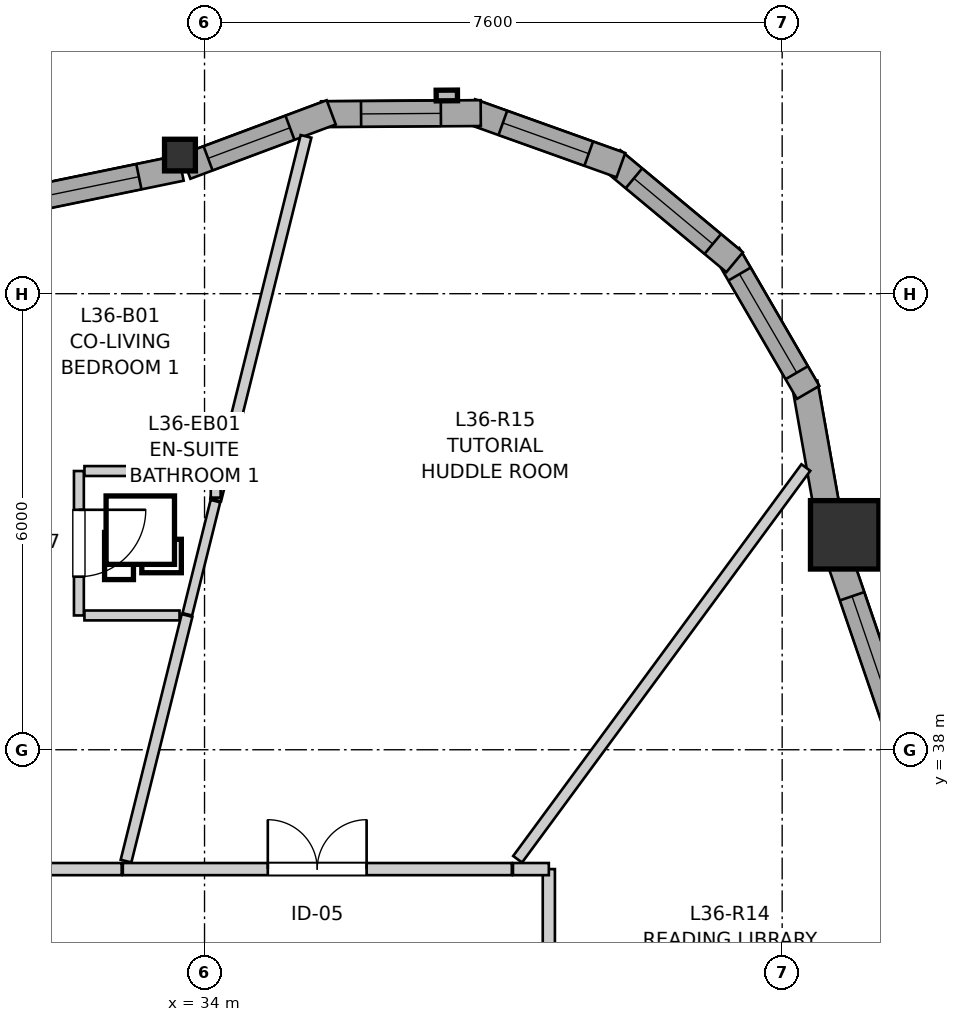
"""IFC4 building model, lengths in metres.
Left out: names, types, materials, properties, quantities, classifications, styles, units other than length and angle.
Written with IfcOpenShell. Run it as: python <this file> out.ifc"""

import sys

from ifc_helpers import new_model, si_unit, direction, frame, frame_2d, origin, origin_2d, place, context, subcontext, project, spatial, rectangle, i_section, extrude, source, transform, mapped, element, fill, save


model = new_model("IFC4")
c1 = context("Model", 3, precision=1e-05, world=origin(), true_north=direction((0.0, 1.0)))
c2 = subcontext(c1, "Body", "Model", "MODEL_VIEW")
j1 = project(units=[si_unit("LENGTHUNIT", "METRE"), si_unit("PLANEANGLEUNIT", "RADIAN")], contexts=[c1])
p1 = place(None, origin())
s1 = spatial("IfcSite", under=j1, at=p1, CompositionType="ELEMENT")
p2 = place(p1, origin())
s2 = spatial("IfcBuilding", under=s1, at=p2, CompositionType="ELEMENT")
p3 = place(p2, frame((0.0, 0.0, 121.6)))
s3 = spatial("IfcBuildingStorey", under=s2, at=p3, CompositionType="ELEMENT", Elevation=121.6)
m1 = source(origin(), c2, "Body", "SweptSolid", [
    extrude(rectangle(XDim=0.9, YDim=0.9, at=origin_2d()), origin(), (0.0, 0.0, 1.0), 2.95),
])
p4 = place(p3, frame((42.423, 40.828, 0.0), z_axis=(0.0, 0.0, 1.0), x_axis=(1.0, 0.0, 0.0)))
e1 = element("IfcColumn", 1, at=p4, inside=s3, PredefinedType="COLUMN", context=c2, shape_type="MappedRepresentation", body=[
    mapped(m1, transform((0.0, 0.0, 0.0), x_axis=(1.0, 0.0, 0.0), y_axis=(0.0, 1.0, 0.0), z_axis=(0.0, 0.0, 1.0), scale=1.0)),
])
m2 = source(origin(), c2, "Body", "SweptSolid", [
    extrude(i_section(OverallWidth=0.406, OverallDepth=0.416, WebThickness=0.027, FlangeThickness=0.044, FilletRadius=0.015, at=origin_2d()), origin(), (0.0, 0.0, 1.0), 2.95),
])
p5 = place(p3, frame((33.677, 45.824, 0.0), z_axis=(0.0, 0.0, 1.0), x_axis=(1.0, 0.0, 0.0)))
e2 = element("IfcColumn", 2, at=p5, inside=s3, PredefinedType="PILASTER", context=c2, shape_type="MappedRepresentation", body=[
    mapped(m2, transform((0.0, 0.0, 0.0), x_axis=(1.0, 0.0, 0.0), y_axis=(0.0, 1.0, 0.0), z_axis=(0.0, 0.0, 1.0), scale=1.0)),
])
p6 = place(p3, frame((43.288, 37.771, 0.0), z_axis=(0.0, 0.0, 1.0), x_axis=(-0.323537149191, 0.94621546864, 0.0)))
e3 = element("IfcWall", 3, at=p6, inside=s3, PredefinedType="SOLIDWALL", context=c2, shape_type="SweptSolid", body=[
    extrude(rectangle(XDim=2.942, YDim=0.34, at=frame_2d((1.471, 0.0))), origin(), (0.0, 0.0, 1.0), 2.48),
])
p7 = place(p6, frame((0.576, 0.0, 0.82)))
e4 = element("IfcOpeningElement", 4, at=p7, cuts=e3, PredefinedType="OPENING", context=c2, shape_type="SweptSolid", body=[
    extrude(rectangle(XDim=1.8, YDim=1.45, at=frame_2d((0.9, 0.725))), frame((0.0, 0.18, 0.0), z_axis=(0.0, -1.0, 0.0), x_axis=(1.0, 0.0, 0.0)), (0.0, 0.0, 1.0), 0.36),
])
p8 = place(p3, frame((42.215, 41.024, 0.0), z_axis=(0.0, 0.0, 1.0), x_axis=(-0.17440141227, 0.984674640375, 0.0)))
e5 = element("IfcWall", 5, at=p8, inside=s3, PredefinedType="SOLIDWALL", context=c2, shape_type="SweptSolid", body=[
    extrude(rectangle(XDim=1.831, YDim=0.34, at=frame_2d((0.916, 0.0))), origin(), (0.0, 0.0, 1.0), 2.48),
])
p9 = place(p3, frame((41.942, 42.701, 0.0), z_axis=(0.0, 0.0, 1.0), x_axis=(-0.501902596059, 0.864924149315, 0.0)))
e6 = element("IfcWall", 6, at=p9, inside=s3, PredefinedType="SOLIDWALL", context=c2, shape_type="SweptSolid", body=[
    extrude(rectangle(XDim=2.099, YDim=0.34, at=frame_2d((1.049, 0.0))), origin(), (0.0, 0.0, 1.0), 2.48),
])
p10 = place(p9, frame((0.3, 0.0, 0.82)))
e7 = element("IfcOpeningElement", 7, at=p10, cuts=e6, PredefinedType="OPENING", context=c2, shape_type="SweptSolid", body=[
    extrude(rectangle(XDim=1.5, YDim=1.45, at=frame_2d((0.75, 0.725))), frame((0.0, 0.18, 0.0), z_axis=(0.0, -1.0, 0.0), x_axis=(1.0, 0.0, 0.0)), (0.0, 0.0, 1.0), 0.36),
])
p11 = place(p3, frame((40.975, 44.414, 0.0), z_axis=(0.0, 0.0, 1.0), x_axis=(-0.768440501876, 0.639921241308, 0.0)))
e8 = element("IfcWall", 8, at=p11, inside=s3, PredefinedType="SOLIDWALL", context=c2, shape_type="SweptSolid", body=[
    extrude(rectangle(XDim=2.099, YDim=0.34, at=frame_2d((1.05, 0.0))), origin(), (0.0, 0.0, 1.0), 2.48),
])
p12 = place(p11, frame((0.375, 0.0, 0.82)))
e9 = element("IfcOpeningElement", 9, at=p12, cuts=e8, PredefinedType="OPENING", context=c2, shape_type="SweptSolid", body=[
    extrude(rectangle(XDim=1.35, YDim=1.45, at=frame_2d((0.675, 0.725))), frame((0.0, 0.18, 0.0), z_axis=(0.0, -1.0, 0.0), x_axis=(1.0, 0.0, 0.0)), (0.0, 0.0, 1.0), 0.36),
])
p13 = place(p3, frame((39.478, 45.691, 0.0), z_axis=(0.0, 0.0, 1.0), x_axis=(-0.941523304278, 0.336947870598, 0.0)))
e10 = element("IfcWall", 10, at=p13, inside=s3, PredefinedType="SOLIDWALL", context=c2, shape_type="SweptSolid", body=[
    extrude(rectangle(XDim=2.099, YDim=0.34, at=frame_2d((1.05, 0.0))), origin(), (0.0, 0.0, 1.0), 2.48),
])
p14 = place(p13, frame((0.449, 0.0, 0.82)))
e11 = element("IfcOpeningElement", 11, at=p14, cuts=e10, PredefinedType="OPENING", context=c2, shape_type="SweptSolid", body=[
    extrude(rectangle(XDim=1.2, YDim=1.45, at=frame_2d((0.6, 0.725))), frame((0.0, 0.18, 0.0), z_axis=(0.0, -1.0, 0.0), x_axis=(1.0, 0.0, 0.0)), (0.0, 0.0, 1.0), 0.36),
])
p15 = place(p3, frame((37.634, 46.376, 0.0), z_axis=(0.0, 0.0, 1.0), x_axis=(-0.999976456891, -0.00686189939, 0.0)))
e12 = element("IfcWall", 12, at=p15, inside=s3, PredefinedType="SOLIDWALL", context=c2, shape_type="SweptSolid", body=[
    extrude(rectangle(XDim=2.099, YDim=0.34, at=frame_2d((1.05, 0.0))), origin(), (0.0, 0.0, 1.0), 2.48),
])
p16 = place(p15, frame((0.524, 0.0, 0.82)))
e13 = element("IfcOpeningElement", 13, at=p16, cuts=e12, PredefinedType="OPENING", context=c2, shape_type="SweptSolid", body=[
    extrude(rectangle(XDim=1.05, YDim=1.45, at=frame_2d((0.525, 0.725))), frame((0.0, 0.18, 0.0), z_axis=(0.0, -1.0, 0.0), x_axis=(1.0, 0.0, 0.0)), (0.0, 0.0, 1.0), 0.36),
])
p17 = place(p3, frame((35.667, 46.386, 0.0), z_axis=(0.0, 0.0, 1.0), x_axis=(-0.936761017964, -0.34996970615, 0.0)))
e14 = element("IfcWall", 14, at=p17, inside=s3, PredefinedType="SOLIDWALL", context=c2, shape_type="SweptSolid", body=[
    extrude(rectangle(XDim=2.041, YDim=0.34, at=frame_2d((1.021, 0.0))), origin(), (0.0, 0.0, 1.0), 2.48),
])
p18 = place(p17, frame((0.579, 0.0, 0.82)))
e15 = element("IfcOpeningElement", 15, at=p18, cuts=e14, PredefinedType="OPENING", context=c2, shape_type="SweptSolid", body=[
    extrude(rectangle(XDim=1.15, YDim=1.2, at=frame_2d((0.575, 0.6))), frame((0.0, 0.18, 0.0), z_axis=(0.0, -1.0, 0.0), x_axis=(1.0, 0.0, 0.0)), (0.0, 0.0, 1.0), 0.36),
])
p19 = place(p3, frame((33.691, 45.653, 0.0), z_axis=(0.0, 0.0, 1.0), x_axis=(-0.979414063846, -0.201861565287, 0.0)))
e16 = element("IfcWall", 16, at=p19, inside=s3, PredefinedType="SOLIDWALL", context=c2, shape_type="SweptSolid", body=[
    extrude(rectangle(XDim=3.104, YDim=0.34, at=frame_2d((1.552, 0.0))), origin(), (0.0, 0.0, 1.0), 2.48),
])
p20 = place(p19, frame((0.567, 0.0, 0.82)))
e17 = element("IfcOpeningElement", 17, at=p20, cuts=e16, PredefinedType="OPENING", context=c2, shape_type="SweptSolid", body=[
    extrude(rectangle(XDim=1.95, YDim=1.4, at=frame_2d((0.975, 0.7))), frame((0.0, 0.18, 0.0), z_axis=(0.0, -1.0, 0.0), x_axis=(1.0, 0.0, 0.0)), (0.0, 0.0, 1.0), 0.36),
])
p21 = place(p3, frame((38.53, 36.43, 0.0), z_axis=(0.0, 0.0, 1.0), x_axis=(0.0, -1.0, 0.0)))
e18 = element("IfcWall", 18, at=p21, inside=s3, PredefinedType="PARTITIONING", context=c2, shape_type="SweptSolid", body=[
    extrude(rectangle(XDim=7.083, YDim=0.16, at=frame_2d((3.542, 0.0))), origin(), (0.0, 0.0, 1.0), 2.588),
])
p22 = place(p21, frame((3.053, 0.0, 0.0)))
e19 = element("IfcOpeningElement", 19, at=p22, cuts=e18, PredefinedType="OPENING", context=c2, shape_type="SweptSolid", body=[
    extrude(rectangle(XDim=0.96, YDim=2.1, at=frame_2d((0.48, 1.05))), frame((0.0, 0.09, 0.0), z_axis=(0.0, -1.0, 0.0), x_axis=(1.0, 0.0, 0.0)), (0.0, 0.0, 1.0), 0.18),
])
p23 = place(p3, frame((32.925, 36.43, 0.0), z_axis=(0.0, 0.0, 1.0), x_axis=(1.0, 0.0, 0.0)))
e20 = element("IfcWall", 20, at=p23, inside=s3, PredefinedType="PARTITIONING", context=c2, shape_type="SweptSolid", body=[
    extrude(rectangle(XDim=5.118, YDim=0.16, at=frame_2d((2.559, 0.0))), origin(), (0.0, 0.0, 1.0), 2.588),
])
p24 = place(p23, frame((1.907, 0.0, 0.0)))
e21 = element("IfcOpeningElement", 21, at=p24, cuts=e20, PredefinedType="OPENING", context=c2, shape_type="SweptSolid", body=[
    extrude(rectangle(XDim=1.3, YDim=2.1, at=frame_2d((0.65, 1.05))), frame((0.0, 0.09, 0.0), z_axis=(0.0, -1.0, 0.0), x_axis=(1.0, 0.0, 0.0)), (0.0, 0.0, 1.0), 0.18),
])
p25 = place(p3, frame((30.063, 36.43, 0.0), z_axis=(0.0, 0.0, 1.0), x_axis=(1.0, 0.0, 0.0)))
e22 = element("IfcWall", 22, at=p25, inside=s3, PredefinedType="PARTITIONING", context=c2, shape_type="SweptSolid", body=[
    extrude(rectangle(XDim=2.847, YDim=0.16, at=frame_2d((1.423, 0.0))), origin(), (0.0, 0.0, 1.0), 2.95),
])
p26 = place(p25, frame((0.964, 0.0, 0.0)))
e23 = element("IfcOpeningElement", 23, at=p26, cuts=e22, PredefinedType="OPENING", context=c2, shape_type="SweptSolid", body=[
    extrude(rectangle(XDim=0.92, YDim=2.1, at=frame_2d((0.46, 1.05))), frame((0.0, 0.09, 0.0), z_axis=(0.0, -1.0, 0.0), x_axis=(1.0, 0.0, 0.0)), (0.0, 0.0, 1.0), 0.18),
])
p27 = place(p3, frame((32.347, 41.667, 0.0), z_axis=(0.0, 0.0, 1.0), x_axis=(0.0, -1.0, 0.0)))
e24 = element("IfcWall", 24, at=p27, inside=s3, PredefinedType="PARTITIONING", context=c2, shape_type="SweptSolid", body=[
    extrude(rectangle(XDim=1.9, YDim=0.13, at=frame_2d((0.95, 0.0))), origin(), (0.0, 0.0, 1.0), 2.95),
])
p28 = place(p27, frame((0.51, 0.0, 0.0)))
e25 = element("IfcOpeningElement", 25, at=p28, cuts=e24, PredefinedType="OPENING", context=c2, shape_type="SweptSolid", body=[
    extrude(rectangle(XDim=0.88, YDim=2.05, at=frame_2d((0.44, 1.025))), frame((0.0, 0.075, 0.0), z_axis=(0.0, -1.0, 0.0), x_axis=(1.0, 0.0, 0.0)), (0.0, 0.0, 1.0), 0.15),
])
p29 = place(p3, frame((38.119, 36.559, 0.0), z_axis=(0.0, 0.0, 1.0), x_axis=(0.592704345809, 0.805420113021, 0.0)))
e26 = element("IfcWall", 26, at=p29, inside=s3, PredefinedType="PARTITIONING", context=c2, shape_type="SweptSolid", body=[
    extrude(rectangle(XDim=6.399, YDim=0.145, at=frame_2d((3.199, 0.0))), origin(), (0.0, 0.0, 1.0), 2.95),
])
p30 = place(p3, frame((34.147, 41.286, 0.0), z_axis=(0.0, 0.0, 1.0), x_axis=(0.241055314039, 0.970511378384, 0.0)))
e27 = element("IfcWall", 27, at=p30, inside=s3, PredefinedType="PARTITIONING", context=c2, shape_type="SweptSolid", body=[
    extrude(rectangle(XDim=4.929, YDim=0.145, at=frame_2d((2.465, 0.0))), origin(), (0.0, 0.0, 1.0), 2.95),
])
p31 = place(p3, frame((32.967, 36.535, 0.0), z_axis=(0.0, 0.0, 1.0), x_axis=(0.241120890255, 0.970495088232, 0.0)))
e28 = element("IfcWall", 28, at=p31, inside=s3, PredefinedType="PARTITIONING", context=c2, shape_type="SweptSolid", body=[
    extrude(rectangle(XDim=3.33, YDim=0.145, at=frame_2d((1.665, 0.0))), origin(), (0.0, 0.0, 1.0), 2.95),
])
p32 = place(p3, frame((32.42, 41.667, 0.0), z_axis=(0.0, 0.0, 1.0), x_axis=(1.0, 0.0, 0.0)))
e29 = element("IfcWall", 29, at=p32, inside=s3, PredefinedType="PARTITIONING", context=c2, shape_type="SweptSolid", body=[
    extrude(rectangle(XDim=1.628, YDim=0.13, at=frame_2d((0.814, 0.0))), origin(), (0.0, 0.0, 1.0), 2.95),
])
p33 = place(p3, frame((33.774, 39.781, 0.0), z_axis=(0.0, 0.0, 1.0), x_axis=(0.240776504653, 0.970580586457, 0.0)))
e30 = element("IfcWall", 30, at=p33, inside=s3, PredefinedType="PARTITIONING", context=c2, shape_type="SweptSolid", body=[
    extrude(rectangle(XDim=1.535, YDim=0.13, at=frame_2d((0.768, 0.0))), origin(), (0.0, 0.0, 1.0), 2.95),
])
p34 = place(p3, frame((32.42, 39.767, 0.0), z_axis=(0.0, 0.0, 1.0), x_axis=(1.0, 0.0, 0.0)))
e31 = element("IfcWall", 31, at=p34, inside=s3, PredefinedType="PARTITIONING", context=c2, shape_type="SweptSolid", body=[
    extrude(rectangle(XDim=1.251, YDim=0.13, at=frame_2d((0.625, 0.0))), origin(), (0.0, 0.0, 1.0), 2.95),
])
p35 = place(p3, frame((38.058, 36.43, 0.0), z_axis=(0.0, 0.0, 1.0), x_axis=(1.0, 0.0, 0.0)))
e32 = element("IfcWall", 32, at=p35, inside=s3, PredefinedType="PARTITIONING", context=c2, shape_type="SweptSolid", body=[
    extrude(rectangle(XDim=0.472, YDim=0.16, at=frame_2d((0.236, 0.0))), origin(), (0.0, 0.0, 1.0), 2.588),
])
p36 = place(p3, frame((34.147, 41.317, 0.0), z_axis=(0.0, 0.0, 1.0), x_axis=(0.0, 1.0, 0.0)))
e33 = element("IfcWall", 33, at=p36, inside=s3, PredefinedType="PARTITIONING", context=c2, shape_type="SweptSolid", body=[
    extrude(rectangle(XDim=0.35, YDim=0.13, at=frame_2d((0.175, 0.0))), origin(), (0.0, 0.0, 1.0), 2.95),
])
m3 = source(origin(), c2, "Body", "SweptSolid", [
    extrude(rectangle(XDim=1.8, YDim=1.45, at=frame_2d((0.9, 0.725))), frame((0.0, 0.03, 0.0), z_axis=(0.0, -1.0, 0.0), x_axis=(1.0, 0.0, 0.0)), (0.0, 0.0, 1.0), 0.06),
])
p37 = place(p7, origin())
e34 = element("IfcWindow", 34, at=p37, inside=s3, PartitioningType="SINGLE_PANEL", PredefinedType="WINDOW", context=c2, shape_type="MappedRepresentation", body=[
    mapped(m3, transform((0.0, 0.0, 0.0), x_axis=(1.0, 0.0, 0.0), y_axis=(0.0, 1.0, 0.0), z_axis=(0.0, 0.0, 1.0), scale=1.0)),
])
fill(e4, e34)
m4 = source(origin(), c2, "Body", "SweptSolid", [
    extrude(rectangle(XDim=1.5, YDim=1.45, at=frame_2d((0.75, 0.725))), frame((0.0, 0.03, 0.0), z_axis=(0.0, -1.0, 0.0), x_axis=(1.0, 0.0, 0.0)), (0.0, 0.0, 1.0), 0.06),
])
p38 = place(p10, origin())
e35 = element("IfcWindow", 35, at=p38, inside=s3, PartitioningType="SINGLE_PANEL", PredefinedType="WINDOW", context=c2, shape_type="MappedRepresentation", body=[
    mapped(m4, transform((0.0, 0.0, 0.0), x_axis=(1.0, 0.0, 0.0), y_axis=(0.0, 1.0, 0.0), z_axis=(0.0, 0.0, 1.0), scale=1.0)),
])
fill(e7, e35)
m5 = source(origin(), c2, "Body", "SweptSolid", [
    extrude(rectangle(XDim=1.35, YDim=1.45, at=frame_2d((0.675, 0.725))), frame((0.0, 0.03, 0.0), z_axis=(0.0, -1.0, 0.0), x_axis=(1.0, 0.0, 0.0)), (0.0, 0.0, 1.0), 0.06),
])
p39 = place(p12, origin())
e36 = element("IfcWindow", 36, at=p39, inside=s3, PartitioningType="SINGLE_PANEL", PredefinedType="WINDOW", context=c2, shape_type="MappedRepresentation", body=[
    mapped(m5, transform((0.0, 0.0, 0.0), x_axis=(1.0, 0.0, 0.0), y_axis=(0.0, 1.0, 0.0), z_axis=(0.0, 0.0, 1.0), scale=1.0)),
])
fill(e9, e36)
m6 = source(origin(), c2, "Body", "SweptSolid", [
    extrude(rectangle(XDim=1.2, YDim=1.45, at=frame_2d((0.6, 0.725))), frame((0.0, 0.03, 0.0), z_axis=(0.0, -1.0, 0.0), x_axis=(1.0, 0.0, 0.0)), (0.0, 0.0, 1.0), 0.06),
])
p40 = place(p14, origin())
e37 = element("IfcWindow", 37, at=p40, inside=s3, PartitioningType="SINGLE_PANEL", PredefinedType="WINDOW", context=c2, shape_type="MappedRepresentation", body=[
    mapped(m6, transform((0.0, 0.0, 0.0), x_axis=(1.0, 0.0, 0.0), y_axis=(0.0, 1.0, 0.0), z_axis=(0.0, 0.0, 1.0), scale=1.0)),
])
fill(e11, e37)
m7 = source(origin(), c2, "Body", "SweptSolid", [
    extrude(rectangle(XDim=1.05, YDim=1.45, at=frame_2d((0.525, 0.725))), frame((0.0, 0.03, 0.0), z_axis=(0.0, -1.0, 0.0), x_axis=(1.0, 0.0, 0.0)), (0.0, 0.0, 1.0), 0.06),
])
p41 = place(p16, origin())
e38 = element("IfcWindow", 38, at=p41, inside=s3, PartitioningType="SINGLE_PANEL", PredefinedType="WINDOW", context=c2, shape_type="MappedRepresentation", body=[
    mapped(m7, transform((0.0, 0.0, 0.0), x_axis=(1.0, 0.0, 0.0), y_axis=(0.0, 1.0, 0.0), z_axis=(0.0, 0.0, 1.0), scale=1.0)),
])
fill(e13, e38)
m8 = source(origin(), c2, "Body", "SweptSolid", [
    extrude(rectangle(XDim=1.15, YDim=1.2, at=frame_2d((0.575, 0.6))), frame((0.0, 0.03, 0.0), z_axis=(0.0, -1.0, 0.0), x_axis=(1.0, 0.0, 0.0)), (0.0, 0.0, 1.0), 0.06),
])
p42 = place(p18, origin())
e39 = element("IfcWindow", 39, at=p42, inside=s3, PartitioningType="SINGLE_PANEL", PredefinedType="WINDOW", context=c2, shape_type="MappedRepresentation", body=[
    mapped(m8, transform((0.0, 0.0, 0.0), x_axis=(1.0, 0.0, 0.0), y_axis=(0.0, 1.0, 0.0), z_axis=(0.0, 0.0, 1.0), scale=1.0)),
])
fill(e15, e39)
m9 = source(origin(), c2, "Body", "SweptSolid", [
    extrude(rectangle(XDim=1.95, YDim=1.4, at=frame_2d((0.975, 0.7))), frame((0.0, 0.03, 0.0), z_axis=(0.0, -1.0, 0.0), x_axis=(1.0, 0.0, 0.0)), (0.0, 0.0, 1.0), 0.06),
])
p43 = place(p20, origin())
e40 = element("IfcWindow", 40, at=p43, inside=s3, PartitioningType="SINGLE_PANEL", PredefinedType="WINDOW", context=c2, shape_type="MappedRepresentation", body=[
    mapped(m9, transform((0.0, 0.0, 0.0), x_axis=(1.0, 0.0, 0.0), y_axis=(0.0, 1.0, 0.0), z_axis=(0.0, 0.0, 1.0), scale=1.0)),
])
fill(e17, e40)
m10 = source(origin(), c2, "Body", "SweptSolid", [
    extrude(rectangle(XDim=1.3, YDim=2.1, at=frame_2d((0.65, 1.05))), frame((0.0, 0.025, 0.0), z_axis=(0.0, -1.0, 0.0), x_axis=(1.0, 0.0, 0.0)), (0.0, 0.0, 1.0), 0.05),
])
p44 = place(p24, origin())
e41 = element("IfcDoor", 41, at=p44, inside=s3, OperationType="DOUBLE_DOOR_SINGLE_SWING", PredefinedType="DOOR", context=c2, shape_type="MappedRepresentation", body=[
    mapped(m10, transform((0.0, 0.0, 0.0), x_axis=(1.0, 0.0, 0.0), y_axis=(0.0, 1.0, 0.0), z_axis=(0.0, 0.0, 1.0), scale=1.0)),
])
fill(e21, e41)
m11 = source(origin(), c2, "Body", "SweptSolid", [
    extrude(rectangle(XDim=0.88, YDim=2.05, at=frame_2d((0.44, 1.025))), frame((0.0, 0.025, 0.0), z_axis=(0.0, -1.0, 0.0), x_axis=(1.0, 0.0, 0.0)), (0.0, 0.0, 1.0), 0.05),
])
p45 = place(p28, origin())
e42 = element("IfcDoor", 42, at=p45, inside=s3, OperationType="SINGLE_SWING_LEFT", PredefinedType="DOOR", context=c2, shape_type="MappedRepresentation", body=[
    mapped(m11, transform((0.0, 0.0, 0.0), x_axis=(1.0, 0.0, 0.0), y_axis=(0.0, 1.0, 0.0), z_axis=(0.0, 0.0, 1.0), scale=1.0)),
])
fill(e25, e42)
save(model, sys.argv[1])
